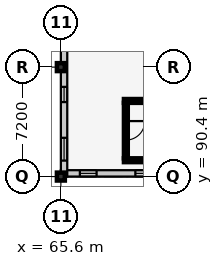
"""IFC4 building model, lengths in metres.
Left out: names, types, materials, properties, quantities, classifications, styles, units other than length and angle.
Written with IfcOpenShell. Run it as: python <this file> out.ifc"""

import sys

from ifc_helpers import new_model, si_unit, direction, frame, frame_2d, origin, origin_2d, place, context, subcontext, project, spatial, rectangle, extrude, element, fill, save


model = new_model("IFC4")
c1 = context("Model", 3, precision=1e-05, world=origin(), true_north=direction((0.0, 1.0)))
c2 = subcontext(c1, "Body", "Model", "MODEL_VIEW")
j1 = project(units=[si_unit("LENGTHUNIT", "METRE"), si_unit("PLANEANGLEUNIT", "RADIAN")], contexts=[c1])
p1 = place(None, origin())
s1 = spatial("IfcSite", under=j1, at=p1, CompositionType="ELEMENT")
p2 = place(p1, origin())
s2 = spatial("IfcBuilding", under=s1, at=p2, CompositionType="ELEMENT")
p3 = place(p2, frame((0.0, 0.0, 18.0)))
s3 = spatial("IfcBuildingStorey", under=s2, at=p3, CompositionType="ELEMENT", Elevation=18.0)
for number, where, z_axis, x_axis in (
    (1, (65.6, 90.4, 0.0), (0.0, 0.0, 1.0), (1.0, 0.0, 0.0)),
    (2, (65.6, 97.6, 0.0), (0.0, 0.0, 1.0), (1.0, 0.0, 0.0)),
):
    element("IfcColumn", number, at=place(p3, frame(where, z_axis=z_axis, x_axis=x_axis)), inside=s3, PredefinedType="COLUMN", context=c2, shape_type="SweptSolid", body=[
        extrude(rectangle(XDim=0.52, YDim=0.52, at=origin_2d()), origin(), (0.0, 0.0, 1.0), 3.9),
    ])
p4 = place(p3, frame((94.4, 90.61, 0.0), z_axis=(0.0, 0.0, 1.0), x_axis=(-1.0, 0.0, 0.0)))
e3 = element("IfcWall", 3, at=p4, inside=s3, PredefinedType="SOLIDWALL", context=c2, shape_type="SweptSolid", body=[
    extrude(rectangle(XDim=28.8, YDim=0.42, at=frame_2d((14.4, 0.0))), origin(), (0.0, 0.0, 1.0), 2.875),
])
p5 = place(p4, frame((1.24, 0.0, 0.9)))
e4 = element("IfcOpeningElement", 4, at=p5, cuts=e3, PredefinedType="OPENING", context=c2, shape_type="SweptSolid", body=[
    extrude(rectangle(XDim=1.12, YDim=1.75, at=frame_2d((0.56, 0.875))), frame((0.0, 0.222, 0.0), z_axis=(0.0, -1.0, 0.0), x_axis=(1.0, 0.0, 0.0)), (0.0, 0.0, 1.0), 0.444),
])
p6 = place(p4, frame((4.78, 0.0, 0.9)))
e5 = element("IfcOpeningElement", 5, at=p6, cuts=e3, PredefinedType="OPENING", context=c2, shape_type="SweptSolid", body=[
    extrude(rectangle(XDim=1.24, YDim=1.75, at=frame_2d((0.62, 0.875))), frame((0.0, 0.222, 0.0), z_axis=(0.0, -1.0, 0.0), x_axis=(1.0, 0.0, 0.0)), (0.0, 0.0, 1.0), 0.444),
])
p7 = place(p4, frame((11.88, 0.0, 0.9)))
e6 = element("IfcOpeningElement", 6, at=p7, cuts=e3, PredefinedType="OPENING", context=c2, shape_type="SweptSolid", body=[
    extrude(rectangle(XDim=1.44, YDim=1.75, at=frame_2d((0.72, 0.875))), frame((0.0, 0.222, 0.0), z_axis=(0.0, -1.0, 0.0), x_axis=(1.0, 0.0, 0.0)), (0.0, 0.0, 1.0), 0.444),
])
p8 = place(p4, frame((15.45, 0.0, 0.9)))
e7 = element("IfcOpeningElement", 7, at=p8, cuts=e3, PredefinedType="OPENING", context=c2, shape_type="SweptSolid", body=[
    extrude(rectangle(XDim=1.5, YDim=1.75, at=frame_2d((0.75, 0.875))), frame((0.0, 0.222, 0.0), z_axis=(0.0, -1.0, 0.0), x_axis=(1.0, 0.0, 0.0)), (0.0, 0.0, 1.0), 0.444),
])
p9 = place(p4, frame((19.35, 0.0, 0.9)))
e8 = element("IfcOpeningElement", 8, at=p9, cuts=e3, PredefinedType="OPENING", context=c2, shape_type="SweptSolid", body=[
    extrude(rectangle(XDim=0.9, YDim=1.35, at=frame_2d((0.45, 0.675))), frame((0.0, 0.222, 0.0), z_axis=(0.0, -1.0, 0.0), x_axis=(1.0, 0.0, 0.0)), (0.0, 0.0, 1.0), 0.444),
])
p10 = place(p4, frame((22.9, 0.0, 0.9)))
e9 = element("IfcOpeningElement", 9, at=p10, cuts=e3, PredefinedType="OPENING", context=c2, shape_type="SweptSolid", body=[
    extrude(rectangle(XDim=1.0, YDim=1.35, at=frame_2d((0.5, 0.675))), frame((0.0, 0.222, 0.0), z_axis=(0.0, -1.0, 0.0), x_axis=(1.0, 0.0, 0.0)), (0.0, 0.0, 1.0), 0.444),
])
p11 = place(p4, frame((26.45, 0.0, 0.9)))
e10 = element("IfcOpeningElement", 10, at=p11, cuts=e3, PredefinedType="OPENING", context=c2, shape_type="SweptSolid", body=[
    extrude(rectangle(XDim=1.1, YDim=1.35, at=frame_2d((0.55, 0.675))), frame((0.0, 0.222, 0.0), z_axis=(0.0, -1.0, 0.0), x_axis=(1.0, 0.0, 0.0)), (0.0, 0.0, 1.0), 0.444),
])
p12 = place(p3, frame((65.81, 90.4, 0.0), z_axis=(0.0, 0.0, 1.0), x_axis=(0.0, 1.0, 0.0)))
e11 = element("IfcWall", 11, at=p12, inside=s3, PredefinedType="SOLIDWALL", context=c2, shape_type="SweptSolid", body=[
    extrude(rectangle(XDim=21.6, YDim=0.42, at=frame_2d((10.8, 0.0))), origin(), (0.0, 0.0, 1.0), 2.975),
])
p13 = place(p12, frame((1.05, 0.0, 0.9)))
e12 = element("IfcOpeningElement", 12, at=p13, cuts=e11, PredefinedType="OPENING", context=c2, shape_type="SweptSolid", body=[
    extrude(rectangle(XDim=1.5, YDim=1.6, at=frame_2d((0.75, 0.8))), frame((0.0, 0.222, 0.0), z_axis=(0.0, -1.0, 0.0), x_axis=(1.0, 0.0, 0.0)), (0.0, 0.0, 1.0), 0.444),
])
p14 = place(p12, frame((4.9, 0.0, 0.9)))
e13 = element("IfcOpeningElement", 13, at=p14, cuts=e11, PredefinedType="OPENING", context=c2, shape_type="SweptSolid", body=[
    extrude(rectangle(XDim=1.0, YDim=1.75, at=frame_2d((0.5, 0.875))), frame((0.0, 0.222, 0.0), z_axis=(0.0, -1.0, 0.0), x_axis=(1.0, 0.0, 0.0)), (0.0, 0.0, 1.0), 0.444),
])
p15 = place(p12, frame((8.44, 0.0, 0.9)))
e14 = element("IfcOpeningElement", 14, at=p15, cuts=e11, PredefinedType="OPENING", context=c2, shape_type="SweptSolid", body=[
    extrude(rectangle(XDim=1.12, YDim=1.75, at=frame_2d((0.56, 0.875))), frame((0.0, 0.222, 0.0), z_axis=(0.0, -1.0, 0.0), x_axis=(1.0, 0.0, 0.0)), (0.0, 0.0, 1.0), 0.444),
])
p16 = place(p12, frame((11.98, 0.0, 0.9)))
e15 = element("IfcOpeningElement", 15, at=p16, cuts=e11, PredefinedType="OPENING", context=c2, shape_type="SweptSolid", body=[
    extrude(rectangle(XDim=1.24, YDim=1.75, at=frame_2d((0.62, 0.875))), frame((0.0, 0.222, 0.0), z_axis=(0.0, -1.0, 0.0), x_axis=(1.0, 0.0, 0.0)), (0.0, 0.0, 1.0), 0.444),
])
p17 = place(p12, frame((15.53, 0.0, 0.9)))
e16 = element("IfcOpeningElement", 16, at=p17, cuts=e11, PredefinedType="OPENING", context=c2, shape_type="SweptSolid", body=[
    extrude(rectangle(XDim=1.34, YDim=1.75, at=frame_2d((0.67, 0.875))), frame((0.0, 0.222, 0.0), z_axis=(0.0, -1.0, 0.0), x_axis=(1.0, 0.0, 0.0)), (0.0, 0.0, 1.0), 0.444),
])
p18 = place(p12, frame((19.08, 0.0, 0.9)))
e17 = element("IfcOpeningElement", 17, at=p18, cuts=e11, PredefinedType="OPENING", context=c2, shape_type="SweptSolid", body=[
    extrude(rectangle(XDim=1.44, YDim=1.75, at=frame_2d((0.72, 0.875))), frame((0.0, 0.222, 0.0), z_axis=(0.0, -1.0, 0.0), x_axis=(1.0, 0.0, 0.0)), (0.0, 0.0, 1.0), 0.444),
])
p19 = place(p3, frame((69.75, 91.475, 0.0), z_axis=(0.0, 0.0, 1.0), x_axis=(1.0, 0.0, 0.0)))
e18 = element("IfcWall", 18, at=p19, inside=s3, PredefinedType="SHEAR", context=c2, shape_type="SweptSolid", body=[
    extrude(rectangle(XDim=9.57, YDim=0.25, at=frame_2d((4.785, 0.0))), origin(), (0.0, 0.0, 1.0), 3.58),
])
p20 = place(p3, frame((78.75, 95.375, 0.0), z_axis=(0.0, 0.0, 1.0), x_axis=(-1.0, 0.0, 0.0)))
e19 = element("IfcWall", 19, at=p20, inside=s3, PredefinedType="SHEAR", context=c2, shape_type="SweptSolid", body=[
    extrude(rectangle(XDim=9.0, YDim=0.25, at=frame_2d((4.5, 0.0))), origin(), (0.0, 0.0, 1.0), 3.58),
])
p21 = place(p3, frame((69.875, 95.25, 0.0), z_axis=(0.0, 0.0, 1.0), x_axis=(0.0, -1.0, 0.0)))
e20 = element("IfcWall", 20, at=p21, inside=s3, PredefinedType="SHEAR", context=c2, shape_type="SweptSolid", body=[
    extrude(rectangle(XDim=3.65, YDim=0.25, at=frame_2d((1.825, 0.0))), origin(), (0.0, 0.0, 1.0), 3.58),
])
p22 = place(p21, frame((1.2, 0.0, 0.0)))
e21 = element("IfcOpeningElement", 21, at=p22, cuts=e20, PredefinedType="OPENING", context=c2, shape_type="SweptSolid", body=[
    extrude(rectangle(XDim=1.25, YDim=2.15, at=frame_2d((0.625, 1.075))), frame((0.0, 0.137, 0.0), z_axis=(0.0, -1.0, 0.0), x_axis=(1.0, 0.0, 0.0)), (0.0, 0.0, 1.0), 0.274),
])
p23 = place(p10, origin())
e22 = element("IfcWindow", 22, at=p23, inside=s3, PartitioningType="SINGLE_PANEL", PredefinedType="WINDOW", context=c2, shape_type="SweptSolid", body=[
    extrude(rectangle(XDim=1.0, YDim=1.35, at=frame_2d((0.5, 0.675))), frame((0.0, 0.03, 0.0), z_axis=(0.0, -1.0, 0.0), x_axis=(1.0, 0.0, 0.0)), (0.0, 0.0, 1.0), 0.06),
])
fill(e9, e22)
p24 = place(p11, origin())
e23 = element("IfcWindow", 23, at=p24, inside=s3, PartitioningType="SINGLE_PANEL", PredefinedType="WINDOW", context=c2, shape_type="SweptSolid", body=[
    extrude(rectangle(XDim=1.1, YDim=1.35, at=frame_2d((0.55, 0.675))), frame((0.0, 0.03, 0.0), z_axis=(0.0, -1.0, 0.0), x_axis=(1.0, 0.0, 0.0)), (0.0, 0.0, 1.0), 0.06),
])
fill(e10, e23)
p25 = place(p13, origin())
e24 = element("IfcWindow", 24, at=p25, inside=s3, PartitioningType="SINGLE_PANEL", PredefinedType="WINDOW", context=c2, shape_type="SweptSolid", body=[
    extrude(rectangle(XDim=1.5, YDim=1.6, at=frame_2d((0.75, 0.8))), frame((0.0, 0.03, 0.0), z_axis=(0.0, -1.0, 0.0), x_axis=(1.0, 0.0, 0.0)), (0.0, 0.0, 1.0), 0.06),
])
fill(e12, e24)
p26 = place(p14, origin())
e25 = element("IfcWindow", 25, at=p26, inside=s3, PartitioningType="SINGLE_PANEL", PredefinedType="WINDOW", context=c2, shape_type="SweptSolid", body=[
    extrude(rectangle(XDim=1.0, YDim=1.75, at=frame_2d((0.5, 0.875))), frame((0.0, 0.03, 0.0), z_axis=(0.0, -1.0, 0.0), x_axis=(1.0, 0.0, 0.0)), (0.0, 0.0, 1.0), 0.06),
])
fill(e13, e25)
p27 = place(p22, origin())
e26 = element("IfcDoor", 26, at=p27, inside=s3, OperationType="SINGLE_SWING_LEFT", PredefinedType="DOOR", context=c2, shape_type="SweptSolid", body=[
    extrude(rectangle(XDim=1.25, YDim=2.15, at=frame_2d((0.625, 1.075))), frame((0.0, 0.025, 0.0), z_axis=(0.0, -1.0, 0.0), x_axis=(1.0, 0.0, 0.0)), (0.0, 0.0, 1.0), 0.05),
])
fill(e21, e26)
save(model, sys.argv[1])
